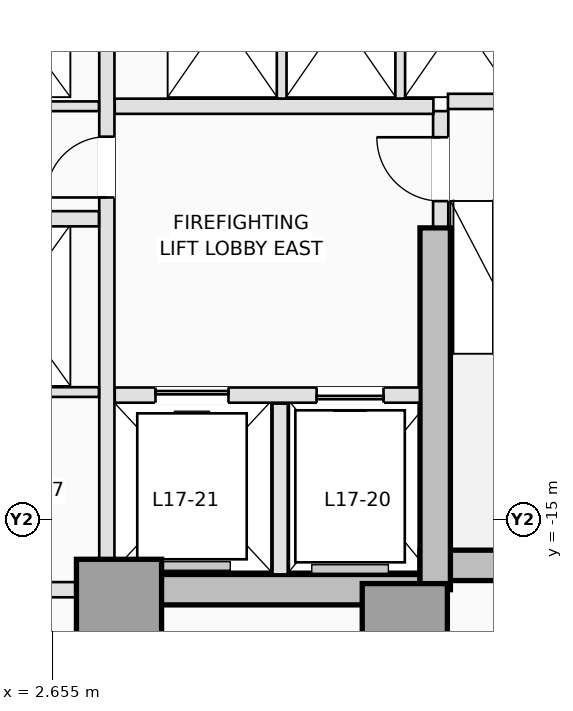
"""IFC4 building model, lengths in metres.
Left out: names, types, materials, properties, quantities, classifications, styles, units other than length and angle.
Written with IfcOpenShell. Run it as: python <this file> out.ifc"""

import sys

from ifc_helpers import new_model, si_unit, direction, frame, frame_2d, origin, origin_2d, place, context, subcontext, project, spatial, rectangle, extrude, element, fill, save


model = new_model("IFC4")
c1 = context("Model", 3, precision=1e-05, world=origin(), true_north=direction((0.0, 1.0)))
c2 = subcontext(c1, "Body", "Model", "MODEL_VIEW")
j1 = project(units=[si_unit("LENGTHUNIT", "METRE"), si_unit("PLANEANGLEUNIT", "RADIAN")], contexts=[c1])
p1 = place(None, origin())
s1 = spatial("IfcSite", under=j1, at=p1, CompositionType="ELEMENT")
p2 = place(p1, origin())
s2 = spatial("IfcBuilding", under=s1, at=p2, CompositionType="ELEMENT")
p3 = place(p2, frame((0.0, 0.0, 66.1)))
s3 = spatial("IfcBuildingStorey", under=s2, at=p3, CompositionType="ELEMENT", Elevation=66.1)
p4 = place(p3, frame((3.75, -16.15, 0.0), z_axis=(0.0, 0.0, 1.0), x_axis=(1.0, 0.0, 0.0)))
e1 = element("IfcWall", 1, at=p4, inside=s3, PredefinedType="SHEAR", context=c2, shape_type="SweptSolid", body=[
    extrude(rectangle(XDim=5.2, YDim=0.5, at=frame_2d((2.6, 0.0))), origin(), (0.0, 0.0, 1.0), 3.5),
])
p5 = place(p3, frame((8.7, -15.75, 0.0), z_axis=(0.0, 0.0, 1.0), x_axis=(1.0, 0.0, 0.0)))
e2 = element("IfcWall", 2, at=p5, inside=s3, PredefinedType="SHEAR", context=c2, shape_type="SweptSolid", body=[
    extrude(rectangle(XDim=4.0, YDim=0.5, at=frame_2d((2.0, 0.0))), origin(), (0.0, 0.0, 1.0), 3.5),
])
p6 = place(p3, frame((8.95, -16.15, 0.0), z_axis=(0.0, 0.0, 1.0), x_axis=(0.0, 1.0, 0.0)))
e3 = element("IfcWall", 3, at=p6, inside=s3, PredefinedType="SHEAR", context=c2, shape_type="SweptSolid", body=[
    extrude(rectangle(XDim=5.95, YDim=0.5, at=frame_2d((2.975, 0.0))), origin(), (0.0, 0.0, 1.0), 3.5),
])
for number, where, z_axis, x_axis in (
    (4, (3.75, -16.35, 0.0), (0.0, 0.0, 1.0), (1.0, 0.0, 0.0)),
    (5, (8.45, -16.75, 0.0), (0.0, 0.0, 1.0), (1.0, 0.0, 0.0)),
):
    element("IfcColumn", number, at=place(p3, frame(where, z_axis=z_axis, x_axis=x_axis)), inside=s3, PredefinedType="COLUMN", context=c2, shape_type="SweptSolid", body=[
        extrude(rectangle(XDim=1.4, YDim=1.4, at=origin_2d()), origin(), (0.0, 0.0, 1.0), 3.5),
    ])
p7 = place(p3, frame((9.04, -10.18, 0.0), z_axis=(0.0, 0.0, 1.0), x_axis=(0.0, 1.0, 0.0)))
e6 = element("IfcWall", 6, at=p7, inside=s3, PredefinedType="PARTITIONING", context=c2, shape_type="SweptSolid", body=[
    extrude(rectangle(XDim=1.9, YDim=0.25, at=frame_2d((0.95, 0.0))), origin(), (0.0, 0.0, 1.0), 3.25),
])
p8 = place(p7, frame((0.42, 0.0, 0.0)))
e7 = element("IfcOpeningElement", 7, at=p8, cuts=e6, PredefinedType="OPENING", context=c2, shape_type="SweptSolid", body=[
    extrude(rectangle(XDim=1.05, YDim=2.15, at=frame_2d((0.525, 1.075))), frame((0.0, 0.135, 0.0), z_axis=(0.0, -1.0, 0.0), x_axis=(1.0, 0.0, 0.0)), (0.0, 0.0, 1.0), 0.27),
])
p9 = place(p3, frame((9.16, -8.12, 0.0), z_axis=(0.0, 0.0, 1.0), x_axis=(1.0, 0.0, 0.0)))
e8 = element("IfcWall", 8, at=p9, inside=s3, PredefinedType="PARTITIONING", context=c2, shape_type="SweptSolid", body=[
    extrude(rectangle(XDim=3.22, YDim=0.25, at=frame_2d((1.61, 0.0))), origin(), (0.0, 0.0, 1.0), 3.25),
])
p10 = place(p3, frame((3.68, -12.95, 0.0), z_axis=(0.0, 0.0, 1.0), x_axis=(1.0, 0.0, 0.0)))
e9 = element("IfcWall", 9, at=p10, inside=s3, PredefinedType="PARTITIONING", context=c2, shape_type="SweptSolid", body=[
    extrude(rectangle(XDim=5.018, YDim=0.25, at=frame_2d((2.509, 0.0))), origin(), (0.0, 0.0, 1.0), 3.25),
])
p11 = place(p10, frame((3.32, 0.0, 0.0)))
e10 = element("IfcOpeningElement", 10, at=p11, cuts=e9, PredefinedType="OPENING", context=c2, shape_type="SweptSolid", body=[
    extrude(rectangle(XDim=1.1, YDim=2.15, at=frame_2d((0.55, 1.075))), frame((0.0, 0.135, 0.0), z_axis=(0.0, -1.0, 0.0), x_axis=(1.0, 0.0, 0.0)), (0.0, 0.0, 1.0), 0.27),
])
p12 = place(p10, frame((0.67, 0.0, 0.0)))
e11 = element("IfcOpeningElement", 11, at=p12, cuts=e9, PredefinedType="OPENING", context=c2, shape_type="SweptSolid", body=[
    extrude(rectangle(XDim=1.2, YDim=2.15, at=frame_2d((0.6, 1.075))), frame((0.0, 0.135, 0.0), z_axis=(0.0, -1.0, 0.0), x_axis=(1.0, 0.0, 0.0)), (0.0, 0.0, 1.0), 0.27),
])
p13 = place(p3, frame((6.4, -15.898, 0.0), z_axis=(0.0, 0.0, 1.0), x_axis=(0.0, 1.0, 0.0)))
e12 = element("IfcWall", 12, at=p13, inside=s3, PredefinedType="PARTITIONING", context=c2, shape_type="SweptSolid", body=[
    extrude(rectangle(XDim=2.808, YDim=0.25, at=frame_2d((1.404, 0.0))), origin(), (0.0, 0.0, 1.0), 3.25),
])
p14 = place(p3, frame((3.68, -8.2, 0.0), z_axis=(0.0, 0.0, 1.0), x_axis=(1.0, 0.0, 0.0)))
e13 = element("IfcWall", 13, at=p14, inside=s3, PredefinedType="PARTITIONING", context=c2, shape_type="SweptSolid", body=[
    extrude(rectangle(XDim=5.24, YDim=0.25, at=frame_2d((2.62, 0.0))), origin(), (0.0, 0.0, 1.0), 3.25),
])
p15 = place(p3, frame((3.55, -15.648, 0.0), z_axis=(0.0, 0.0, 1.0), x_axis=(0.0, 1.0, 0.0)))
e14 = element("IfcWall", 14, at=p15, inside=s3, PredefinedType="PARTITIONING", context=c2, shape_type="SweptSolid", body=[
    extrude(rectangle(XDim=10.146, YDim=0.25, at=frame_2d((5.073, 0.0))), origin(), (0.0, 0.0, 1.0), 3.25),
])
p16 = place(p15, frame((5.948, 0.0, 0.0)))
e15 = element("IfcOpeningElement", 15, at=p16, cuts=e14, PredefinedType="OPENING", context=c2, shape_type="SweptSolid", body=[
    extrude(rectangle(XDim=1.0, YDim=2.15, at=frame_2d((0.5, 1.075))), frame((0.0, 0.135, 0.0), z_axis=(0.0, -1.0, 0.0), x_axis=(1.0, 0.0, 0.0)), (0.0, 0.0, 1.0), 0.27),
])
for number, where, z_axis, x_axis in (
    (16, (6.425, -8.073, 0.0), (0.0, 0.0, 1.0), (0.0, 1.0, 0.0)),
    (17, (8.375, -8.073, 0.0), (0.0, 0.0, 1.0), (0.0, 1.0, 0.0)),
):
    element("IfcWall", number, at=place(p3, frame(where, z_axis=z_axis, x_axis=x_axis)), inside=s3, PredefinedType="PARTITIONING", context=c2, shape_type="SweptSolid", body=[
        extrude(rectangle(XDim=2.733, YDim=0.16, at=frame_2d((1.366, 0.0))), origin(), (0.0, 0.0, 1.0), 3.25),
    ])
p17 = place(p3, frame((-3.048, -16.15, 0.0), z_axis=(0.0, 0.0, 1.0), x_axis=(1.0, 0.0, 0.0)))
e18 = element("IfcWall", 18, at=p17, inside=s3, PredefinedType="PARTITIONING", context=c2, shape_type="SweptSolid", body=[
    extrude(rectangle(XDim=6.096, YDim=0.25, at=frame_2d((3.048, 0.0))), origin(), (0.0, 0.0, 1.0), 2.3),
])
p18 = place(p3, frame((0.95, -8.2, 0.0), z_axis=(0.0, 0.0, 1.0), x_axis=(1.0, 0.0, 0.0)))
e19 = element("IfcWall", 19, at=p18, inside=s3, PredefinedType="PARTITIONING", context=c2, shape_type="SweptSolid", body=[
    extrude(rectangle(XDim=2.47, YDim=0.16, at=frame_2d((1.235, 0.0))), origin(), (0.0, 0.0, 1.0), 3.25),
])
p19 = place(p3, frame((0.95, -10.05, 0.0), z_axis=(0.0, 0.0, 1.0), x_axis=(1.0, 0.0, 0.0)))
e20 = element("IfcWall", 20, at=p19, inside=s3, PredefinedType="PARTITIONING", context=c2, shape_type="SweptSolid", body=[
    extrude(rectangle(XDim=2.47, YDim=0.25, at=frame_2d((1.235, 0.0))), origin(), (0.0, 0.0, 1.0), 3.25),
])
p20 = place(p3, frame((-3.42, -12.9, 0.0), z_axis=(0.0, 0.0, 1.0), x_axis=(1.0, 0.0, 0.0)))
e21 = element("IfcWall", 21, at=p20, inside=s3, PredefinedType="PARTITIONING", context=c2, shape_type="SweptSolid", body=[
    extrude(rectangle(XDim=6.84, YDim=0.16, at=frame_2d((3.42, 0.0))), origin(), (0.0, 0.0, 1.0), 3.25),
])
p21 = place(p20, frame((2.98, 0.0, 0.0)))
e22 = element("IfcOpeningElement", 22, at=p21, cuts=e21, PredefinedType="OPENING", context=c2, shape_type="SweptSolid", body=[
    extrude(rectangle(XDim=0.88, YDim=2.12, at=frame_2d((0.44, 1.06))), frame((0.0, 0.09, 0.0), z_axis=(0.0, -1.0, 0.0), x_axis=(1.0, 0.0, 0.0)), (0.0, 0.0, 1.0), 0.18),
])
p22 = place(p11, origin())
e23 = element("IfcDoor", 23, at=p22, inside=s3, OperationType="SLIDING_TO_RIGHT", PredefinedType="DOOR", context=c2, shape_type="SweptSolid", body=[
    extrude(rectangle(XDim=1.1, YDim=2.15, at=frame_2d((0.55, 1.075))), frame((0.0, 0.025, 0.0), z_axis=(0.0, -1.0, 0.0), x_axis=(1.0, 0.0, 0.0)), (0.0, 0.0, 1.0), 0.05),
])
fill(e10, e23)
p23 = place(p12, origin())
e24 = element("IfcDoor", 24, at=p23, inside=s3, OperationType="SLIDING_TO_LEFT", PredefinedType="DOOR", context=c2, shape_type="SweptSolid", body=[
    extrude(rectangle(XDim=1.2, YDim=2.15, at=frame_2d((0.6, 1.075))), frame((0.0, 0.025, 0.0), z_axis=(0.0, -1.0, 0.0), x_axis=(1.0, 0.0, 0.0)), (0.0, 0.0, 1.0), 0.05),
])
fill(e11, e24)
p24 = place(p8, origin())
e25 = element("IfcDoor", 25, at=p24, inside=s3, OperationType="SINGLE_SWING_RIGHT", PredefinedType="DOOR", context=c2, shape_type="SweptSolid", body=[
    extrude(rectangle(XDim=1.05, YDim=2.15, at=frame_2d((0.525, 1.075))), frame((0.0, 0.025, 0.0), z_axis=(0.0, -1.0, 0.0), x_axis=(1.0, 0.0, 0.0)), (0.0, 0.0, 1.0), 0.05),
])
fill(e7, e25)
p25 = place(p16, origin())
e26 = element("IfcDoor", 26, at=p25, inside=s3, OperationType="SINGLE_SWING_LEFT", PredefinedType="DOOR", context=c2, shape_type="SweptSolid", body=[
    extrude(rectangle(XDim=1.0, YDim=2.15, at=frame_2d((0.5, 1.075))), frame((0.0, 0.025, 0.0), z_axis=(0.0, -1.0, 0.0), x_axis=(1.0, 0.0, 0.0)), (0.0, 0.0, 1.0), 0.05),
])
fill(e15, e26)
save(model, sys.argv[1])
